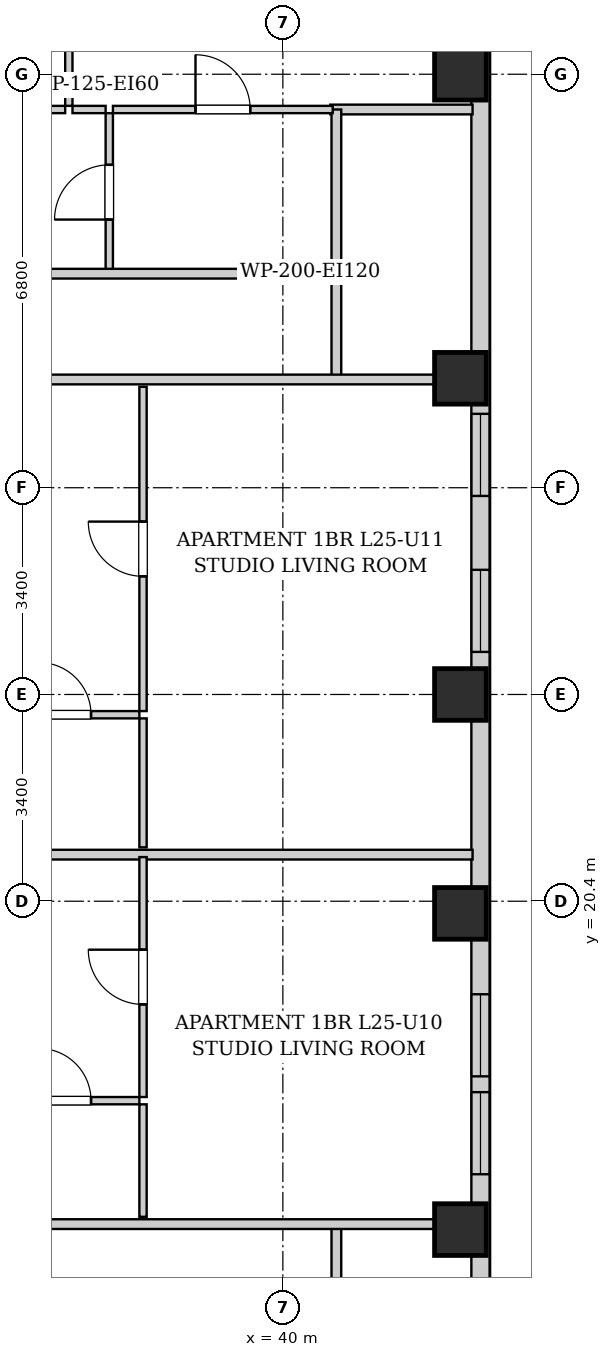
"""IFC4 building model, lengths in metres.
Left out: names, types, materials, properties, quantities, classifications, styles, units other than length and angle.
Written with IfcOpenShell. Run it as: python <this file> out.ifc"""

import sys

from ifc_helpers import new_model, si_unit, direction, frame, frame_2d, origin, origin_2d, place, context, subcontext, project, spatial, rectangle, extrude, element, fill, save


model = new_model("IFC4")
c1 = context("Model", 3, precision=1e-05, world=origin(), true_north=direction((0.0, 1.0)))
c2 = subcontext(c1, "Body", "Model", "MODEL_VIEW")
j1 = project(units=[si_unit("LENGTHUNIT", "METRE"), si_unit("PLANEANGLEUNIT", "RADIAN")], contexts=[c1])
p1 = place(None, origin())
s1 = spatial("IfcSite", under=j1, at=p1, CompositionType="ELEMENT")
p2 = place(p1, origin())
s2 = spatial("IfcBuilding", under=s1, at=p2, CompositionType="ELEMENT")
p3 = place(p2, frame((0.0, 0.0, 91.1)))
s3 = spatial("IfcBuildingStorey", under=s2, at=p3, CompositionType="ELEMENT", Elevation=91.1)
for number, where, z_axis, x_axis in (
    (1, (42.92, 15.0, 0.0), (0.0, 0.0, 1.0), (1.0, 0.0, 0.0)),
    (2, (42.92, 20.2, 0.0), (0.0, 0.0, 1.0), (1.0, 0.0, 0.0)),
    (3, (42.92, 23.8, 0.0), (0.0, 0.0, 1.0), (1.0, 0.0, 0.0)),
    (4, (42.92, 29.0, 0.0), (0.0, 0.0, 1.0), (1.0, 0.0, 0.0)),
    (5, (42.92, 34.0, 0.0), (0.0, 0.0, 1.0), (1.0, 0.0, 0.0)),
):
    element("IfcColumn", number, at=place(p3, frame(where, z_axis=z_axis, x_axis=x_axis)), inside=s3, PredefinedType="COLUMN", context=c2, shape_type="SweptSolid", body=[
        extrude(rectangle(XDim=0.85, YDim=0.85, at=origin_2d()), origin(), (0.0, 0.0, 1.0), 3.2),
    ])
p4 = place(p3, frame((43.25, 40.8, 0.0), z_axis=(0.0, 0.0, 1.0), x_axis=(0.0, -1.0, 0.0)))
e6 = element("IfcWall", 6, at=p4, inside=s3, PredefinedType="SOLIDWALL", context=c2, shape_type="SweptSolid", body=[
    extrude(rectangle(XDim=38.3, YDim=0.3, at=frame_2d((19.15, 0.0))), origin(), (0.0, 0.0, 1.0), 2.94),
])
p5 = place(p4, frame((33.495, 0.0, 0.55)))
e7 = element("IfcOpeningElement", 7, at=p5, cuts=e6, PredefinedType="OPENING", context=c2, shape_type="SweptSolid", body=[
    extrude(rectangle(XDim=1.35, YDim=1.2, at=frame_2d((0.675, 0.6))), frame((0.0, 0.16, 0.0), z_axis=(0.0, -1.0, 0.0), x_axis=(1.0, 0.0, 0.0)), (0.0, 0.0, 1.0), 0.32),
])
p6 = place(p4, frame((31.785, 0.0, 0.55)))
e8 = element("IfcOpeningElement", 8, at=p6, cuts=e6, PredefinedType="OPENING", context=c2, shape_type="SweptSolid", body=[
    extrude(rectangle(XDim=1.35, YDim=1.2, at=frame_2d((0.675, 0.6))), frame((0.0, 0.16, 0.0), z_axis=(0.0, -1.0, 0.0), x_axis=(1.0, 0.0, 0.0)), (0.0, 0.0, 1.0), 0.32),
])
p7 = place(p4, frame((3.08, 0.0, 0.55)))
e9 = element("IfcOpeningElement", 9, at=p7, cuts=e6, PredefinedType="OPENING", context=c2, shape_type="SweptSolid", body=[
    extrude(rectangle(XDim=1.35, YDim=1.2, at=frame_2d((0.675, 0.6))), frame((0.0, 0.16, 0.0), z_axis=(0.0, -1.0, 0.0), x_axis=(1.0, 0.0, 0.0)), (0.0, 0.0, 1.0), 0.32),
])
p8 = place(p4, frame((1.135, 0.0, 0.55)))
e10 = element("IfcOpeningElement", 10, at=p8, cuts=e6, PredefinedType="OPENING", context=c2, shape_type="SweptSolid", body=[
    extrude(rectangle(XDim=1.35, YDim=1.2, at=frame_2d((0.675, 0.6))), frame((0.0, 0.16, 0.0), z_axis=(0.0, -1.0, 0.0), x_axis=(1.0, 0.0, 0.0)), (0.0, 0.0, 1.0), 0.32),
])
p9 = place(p4, frame((21.93, 0.0, 0.55)))
e11 = element("IfcOpeningElement", 11, at=p9, cuts=e6, PredefinedType="OPENING", context=c2, shape_type="SweptSolid", body=[
    extrude(rectangle(XDim=1.35, YDim=1.2, at=frame_2d((0.675, 0.6))), frame((0.0, 0.16, 0.0), z_axis=(0.0, -1.0, 0.0), x_axis=(1.0, 0.0, 0.0)), (0.0, 0.0, 1.0), 0.32),
])
p10 = place(p4, frame((23.54, 0.0, 0.55)))
e12 = element("IfcOpeningElement", 12, at=p10, cuts=e6, PredefinedType="OPENING", context=c2, shape_type="SweptSolid", body=[
    extrude(rectangle(XDim=1.35, YDim=1.2, at=frame_2d((0.675, 0.6))), frame((0.0, 0.16, 0.0), z_axis=(0.0, -1.0, 0.0), x_axis=(1.0, 0.0, 0.0)), (0.0, 0.0, 1.0), 0.32),
])
p11 = place(p4, frame((14.95, 0.0, 0.55)))
e13 = element("IfcOpeningElement", 13, at=p11, cuts=e6, PredefinedType="OPENING", context=c2, shape_type="SweptSolid", body=[
    extrude(rectangle(XDim=1.35, YDim=1.2, at=frame_2d((0.675, 0.6))), frame((0.0, 0.16, 0.0), z_axis=(0.0, -1.0, 0.0), x_axis=(1.0, 0.0, 0.0)), (0.0, 0.0, 1.0), 0.32),
])
p12 = place(p4, frame((12.385, 0.0, 0.55)))
e14 = element("IfcOpeningElement", 14, at=p12, cuts=e6, PredefinedType="OPENING", context=c2, shape_type="SweptSolid", body=[
    extrude(rectangle(XDim=1.35, YDim=1.2, at=frame_2d((0.675, 0.6))), frame((0.0, 0.16, 0.0), z_axis=(0.0, -1.0, 0.0), x_axis=(1.0, 0.0, 0.0)), (0.0, 0.0, 1.0), 0.32),
])
for number, where, z_axis, x_axis in (
    (15, (40.88, 13.35, 0.0), (0.0, 0.0, 1.0), (0.0, 1.0, 0.0)),
    (16, (40.88, 28.98, 0.0), (0.0, 0.0, 1.0), (0.0, 1.0, 0.0)),
):
    element("IfcWall", number, at=place(p3, frame(where, z_axis=z_axis, x_axis=x_axis)), inside=s3, PredefinedType="PARTITIONING", context=c2, shape_type="SweptSolid", body=[
        extrude(rectangle(XDim=1.74, YDim=0.16, at=frame_2d((0.87, 0.0))), origin(), (0.0, 0.0, 1.0), 2.94),
    ])
for number, where, z_axis, x_axis in (
    (17, (35.11, 15.09, 0.0), (0.0, 0.0, 1.0), (1.0, 0.0, 0.0)),
    (18, (35.11, 28.98, 0.0), (0.0, 0.0, 1.0), (1.0, 0.0, 0.0)),
):
    element("IfcWall", number, at=place(p3, frame(where, z_axis=z_axis, x_axis=x_axis)), inside=s3, PredefinedType="PARTITIONING", context=c2, shape_type="SweptSolid", body=[
        extrude(rectangle(XDim=8.01, YDim=0.16, at=frame_2d((4.005, 0.0))), origin(), (0.0, 0.0, 1.0), 2.309),
    ])
p13 = place(p3, frame((40.78, 33.42, 0.0), z_axis=(0.0, 0.0, 1.0), x_axis=(1.0, 0.0, 0.0)))
e19 = element("IfcWall", 19, at=p13, inside=s3, PredefinedType="PARTITIONING", context=c2, shape_type="SweptSolid", body=[
    extrude(rectangle(XDim=2.34, YDim=0.16, at=frame_2d((1.17, 0.0))), origin(), (0.0, 0.0, 1.0), 2.94),
])
p14 = place(p3, frame((40.88, 30.76, 0.0), z_axis=(0.0, 0.0, 1.0), x_axis=(0.0, 1.0, 0.0)))
e20 = element("IfcWall", 20, at=p14, inside=s3, PredefinedType="PARTITIONING", context=c2, shape_type="SweptSolid", body=[
    extrude(rectangle(XDim=2.66, YDim=0.16, at=frame_2d((1.33, 0.0))), origin(), (0.0, 0.0, 1.0), 2.94),
])
p15 = place(p3, frame((37.145, 30.76, 0.0), z_axis=(0.0, 0.0, 1.0), x_axis=(0.0, 1.0, 0.0)))
e21 = element("IfcWall", 21, at=p15, inside=s3, PredefinedType="PARTITIONING", context=c2, shape_type="SweptSolid", body=[
    extrude(rectangle(XDim=2.6, YDim=0.12, at=frame_2d((1.3, 0.0))), origin(), (0.0, 0.0, 1.0), 2.94),
])
p16 = place(p15, frame((0.85, 0.0, 0.0)))
e22 = element("IfcOpeningElement", 22, at=p16, cuts=e21, PredefinedType="OPENING", context=c2, shape_type="SweptSolid", body=[
    extrude(rectangle(XDim=0.9, YDim=2.05, at=frame_2d((0.45, 1.025))), frame((0.0, 0.07, 0.0), z_axis=(0.0, -1.0, 0.0), x_axis=(1.0, 0.0, 0.0)), (0.0, 0.0, 1.0), 0.14),
])
p17 = place(p3, frame((33.7, 33.42, 0.0), z_axis=(0.0, 0.0, 1.0), x_axis=(1.0, 0.0, 0.0)))
e23 = element("IfcWall", 23, at=p17, inside=s3, PredefinedType="PARTITIONING", context=c2, shape_type="SweptSolid", body=[
    extrude(rectangle(XDim=2.72, YDim=0.12, at=frame_2d((1.36, 0.0))), origin(), (0.0, 0.0, 1.0), 2.94),
])
p18 = place(p17, frame((0.91, 0.0, 0.0)))
e24 = element("IfcOpeningElement", 24, at=p18, cuts=e23, PredefinedType="OPENING", context=c2, shape_type="SweptSolid", body=[
    extrude(rectangle(XDim=0.9, YDim=2.05, at=frame_2d((0.45, 1.025))), frame((0.0, 0.07, 0.0), z_axis=(0.0, -1.0, 0.0), x_axis=(1.0, 0.0, 0.0)), (0.0, 0.0, 1.0), 0.14),
])
p19 = place(p3, frame((36.54, 33.42, 0.0), z_axis=(0.0, 0.0, 1.0), x_axis=(1.0, 0.0, 0.0)))
e25 = element("IfcWall", 25, at=p19, inside=s3, PredefinedType="PARTITIONING", context=c2, shape_type="SweptSolid", body=[
    extrude(rectangle(XDim=0.545, YDim=0.12, at=frame_2d((0.272, 0.0))), origin(), (0.0, 0.0, 1.0), 2.94),
])
p20 = place(p3, frame((37.205, 33.42, 0.0), z_axis=(0.0, 0.0, 1.0), x_axis=(1.0, 0.0, 0.0)))
e26 = element("IfcWall", 26, at=p20, inside=s3, PredefinedType="PARTITIONING", context=c2, shape_type="SweptSolid", body=[
    extrude(rectangle(XDim=3.615, YDim=0.12, at=frame_2d((1.808, 0.0))), origin(), (0.0, 0.0, 1.0), 2.94),
])
p21 = place(p20, frame((1.358, 0.0, 0.0)))
e27 = element("IfcOpeningElement", 27, at=p21, cuts=e26, PredefinedType="OPENING", context=c2, shape_type="SweptSolid", body=[
    extrude(rectangle(XDim=0.9, YDim=2.05, at=frame_2d((0.45, 1.025))), frame((0.0, 0.07, 0.0), z_axis=(0.0, -1.0, 0.0), x_axis=(1.0, 0.0, 0.0)), (0.0, 0.0, 1.0), 0.14),
])
p22 = place(p3, frame((36.48, 33.48, 0.0), z_axis=(0.0, 0.0, 1.0), x_axis=(0.0, 1.0, 0.0)))
e28 = element("IfcWall", 28, at=p22, inside=s3, PredefinedType="PARTITIONING", context=c2, shape_type="SweptSolid", body=[
    extrude(rectangle(XDim=7.39, YDim=0.12, at=frame_2d((3.695, 0.0))), origin(), (0.0, 0.0, 1.0), 2.94),
])
p23 = place(p22, frame((3.245, 0.0, 0.0)))
e29 = element("IfcOpeningElement", 29, at=p23, cuts=e28, PredefinedType="OPENING", context=c2, shape_type="SweptSolid", body=[
    extrude(rectangle(XDim=0.9, YDim=2.05, at=frame_2d((0.45, 1.025))), frame((0.0, 0.07, 0.0), z_axis=(0.0, -1.0, 0.0), x_axis=(1.0, 0.0, 0.0)), (0.0, 0.0, 1.0), 0.14),
])
p24 = place(p3, frame((35.19, 21.166, 0.0), z_axis=(0.0, 0.0, 1.0), x_axis=(1.0, 0.0, 0.0)))
e30 = element("IfcWall", 30, at=p24, inside=s3, PredefinedType="PARTITIONING", context=c2, shape_type="SweptSolid", body=[
    extrude(rectangle(XDim=7.93, YDim=0.16, at=frame_2d((3.965, 0.0))), origin(), (0.0, 0.0, 1.0), 2.94),
])
p25 = place(p3, frame((35.19, 17.12, 0.0), z_axis=(0.0, 0.0, 1.0), x_axis=(1.0, 0.0, 0.0)))
e31 = element("IfcWall", 31, at=p25, inside=s3, PredefinedType="PARTITIONING", context=c2, shape_type="SweptSolid", body=[
    extrude(rectangle(XDim=2.45, YDim=0.12, at=frame_2d((1.225, 0.0))), origin(), (0.0, 0.0, 1.0), 2.94),
])
p26 = place(p25, frame((0.795, 0.0, 0.0)))
e32 = element("IfcOpeningElement", 32, at=p26, cuts=e31, PredefinedType="OPENING", context=c2, shape_type="SweptSolid", body=[
    extrude(rectangle(XDim=0.86, YDim=2.05, at=frame_2d((0.43, 1.025))), frame((0.0, 0.07, 0.0), z_axis=(0.0, -1.0, 0.0), x_axis=(1.0, 0.0, 0.0)), (0.0, 0.0, 1.0), 0.14),
])
p27 = place(p3, frame((37.7, 15.21, 0.0), z_axis=(0.0, 0.0, 1.0), x_axis=(0.0, 1.0, 0.0)))
e33 = element("IfcWall", 33, at=p27, inside=s3, PredefinedType="PARTITIONING", context=c2, shape_type="SweptSolid", body=[
    extrude(rectangle(XDim=1.85, YDim=0.12, at=frame_2d((0.925, 0.0))), origin(), (0.0, 0.0, 1.0), 2.94),
])
p28 = place(p3, frame((37.7, 17.18, 0.0), z_axis=(0.0, 0.0, 1.0), x_axis=(0.0, 1.0, 0.0)))
e34 = element("IfcWall", 34, at=p28, inside=s3, PredefinedType="PARTITIONING", context=c2, shape_type="SweptSolid", body=[
    extrude(rectangle(XDim=3.946, YDim=0.12, at=frame_2d((1.973, 0.0))), origin(), (0.0, 0.0, 1.0), 2.94),
])
p29 = place(p28, frame((1.523, 0.0, 0.0)))
e35 = element("IfcOpeningElement", 35, at=p29, cuts=e34, PredefinedType="OPENING", context=c2, shape_type="SweptSolid", body=[
    extrude(rectangle(XDim=0.9, YDim=2.05, at=frame_2d((0.45, 1.025))), frame((0.0, 0.07, 0.0), z_axis=(0.0, -1.0, 0.0), x_axis=(1.0, 0.0, 0.0)), (0.0, 0.0, 1.0), 0.14),
])
p30 = place(p3, frame((35.19, 23.467, 0.0), z_axis=(0.0, 0.0, 1.0), x_axis=(1.0, 0.0, 0.0)))
e36 = element("IfcWall", 36, at=p30, inside=s3, PredefinedType="PARTITIONING", context=c2, shape_type="SweptSolid", body=[
    extrude(rectangle(XDim=2.45, YDim=0.12, at=frame_2d((1.225, 0.0))), origin(), (0.0, 0.0, 1.0), 2.94),
])
p31 = place(p30, frame((0.795, 0.0, 0.0)))
e37 = element("IfcOpeningElement", 37, at=p31, cuts=e36, PredefinedType="OPENING", context=c2, shape_type="SweptSolid", body=[
    extrude(rectangle(XDim=0.86, YDim=2.05, at=frame_2d((0.43, 1.025))), frame((0.0, 0.07, 0.0), z_axis=(0.0, -1.0, 0.0), x_axis=(1.0, 0.0, 0.0)), (0.0, 0.0, 1.0), 0.14),
])
p32 = place(p3, frame((37.7, 21.286, 0.0), z_axis=(0.0, 0.0, 1.0), x_axis=(0.0, 1.0, 0.0)))
e38 = element("IfcWall", 38, at=p32, inside=s3, PredefinedType="PARTITIONING", context=c2, shape_type="SweptSolid", body=[
    extrude(rectangle(XDim=2.121, YDim=0.12, at=frame_2d((1.061, 0.0))), origin(), (0.0, 0.0, 1.0), 2.94),
])
p33 = place(p3, frame((37.7, 23.527, 0.0), z_axis=(0.0, 0.0, 1.0), x_axis=(0.0, 1.0, 0.0)))
e39 = element("IfcWall", 39, at=p33, inside=s3, PredefinedType="PARTITIONING", context=c2, shape_type="SweptSolid", body=[
    extrude(rectangle(XDim=5.333, YDim=0.12, at=frame_2d((2.667, 0.0))), origin(), (0.0, 0.0, 1.0), 2.94),
])
p34 = place(p33, frame((2.216, 0.0, 0.0)))
e40 = element("IfcOpeningElement", 40, at=p34, cuts=e39, PredefinedType="OPENING", context=c2, shape_type="SweptSolid", body=[
    extrude(rectangle(XDim=0.9, YDim=2.05, at=frame_2d((0.45, 1.025))), frame((0.0, 0.07, 0.0), z_axis=(0.0, -1.0, 0.0), x_axis=(1.0, 0.0, 0.0)), (0.0, 0.0, 1.0), 0.14),
])
p35 = place(p3, frame((10.05, 30.72, 0.0), z_axis=(0.0, 0.0, 1.0), x_axis=(1.0, 0.0, 0.0)))
e41 = element("IfcWall", 41, at=p35, inside=s3, PredefinedType="PARTITIONING", context=c2, shape_type="SweptSolid", body=[
    extrude(rectangle(XDim=30.8, YDim=0.16, at=frame_2d((15.4, 0.0))), origin(), (0.0, 0.0, 1.0), 2.94),
])
p36 = place(p35, frame((4.295, 0.0, 0.0)))
e42 = element("IfcOpeningElement", 42, at=p36, cuts=e41, PredefinedType="OPENING", context=c2, shape_type="SweptSolid", body=[
    extrude(rectangle(XDim=0.95, YDim=2.1, at=frame_2d((0.475, 1.05))), frame((0.0, 0.09, 0.0), z_axis=(0.0, -1.0, 0.0), x_axis=(1.0, 0.0, 0.0)), (0.0, 0.0, 1.0), 0.18),
])
p37 = place(p35, frame((14.179, 0.0, 0.0)))
e43 = element("IfcOpeningElement", 43, at=p37, cuts=e41, PredefinedType="OPENING", context=c2, shape_type="SweptSolid", body=[
    extrude(rectangle(XDim=0.95, YDim=2.1, at=frame_2d((0.475, 1.05))), frame((0.0, 0.09, 0.0), z_axis=(0.0, -1.0, 0.0), x_axis=(1.0, 0.0, 0.0)), (0.0, 0.0, 1.0), 0.18),
])
p38 = place(p35, frame((20.965, 0.0, 0.0)))
e44 = element("IfcOpeningElement", 44, at=p38, cuts=e41, PredefinedType="OPENING", context=c2, shape_type="SweptSolid", body=[
    extrude(rectangle(XDim=0.95, YDim=2.1, at=frame_2d((0.475, 1.05))), frame((0.0, 0.09, 0.0), z_axis=(0.0, -1.0, 0.0), x_axis=(1.0, 0.0, 0.0)), (0.0, 0.0, 1.0), 0.18),
])
p39 = place(p16, origin())
e45 = element("IfcDoor", 45, at=p39, inside=s3, OperationType="SINGLE_SWING_LEFT", PredefinedType="DOOR", context=c2, shape_type="SweptSolid", body=[
    extrude(rectangle(XDim=0.9, YDim=2.05, at=frame_2d((0.45, 1.025))), frame((0.0, 0.025, 0.0), z_axis=(0.0, -1.0, 0.0), x_axis=(1.0, 0.0, 0.0)), (0.0, 0.0, 1.0), 0.05),
])
fill(e22, e45)
p40 = place(p21, origin())
e46 = element("IfcDoor", 46, at=p40, inside=s3, OperationType="SINGLE_SWING_LEFT", PredefinedType="DOOR", context=c2, shape_type="SweptSolid", body=[
    extrude(rectangle(XDim=0.9, YDim=2.05, at=frame_2d((0.45, 1.025))), frame((0.0, 0.025, 0.0), z_axis=(0.0, -1.0, 0.0), x_axis=(1.0, 0.0, 0.0)), (0.0, 0.0, 1.0), 0.05),
])
fill(e27, e46)
p41 = place(p26, origin())
e47 = element("IfcDoor", 47, at=p41, inside=s3, OperationType="SINGLE_SWING_LEFT", PredefinedType="DOOR", context=c2, shape_type="SweptSolid", body=[
    extrude(rectangle(XDim=0.86, YDim=2.05, at=frame_2d((0.43, 1.025))), frame((0.0, 0.025, 0.0), z_axis=(0.0, -1.0, 0.0), x_axis=(1.0, 0.0, 0.0)), (0.0, 0.0, 1.0), 0.05),
])
fill(e32, e47)
p42 = place(p29, origin())
e48 = element("IfcDoor", 48, at=p42, inside=s3, OperationType="SINGLE_SWING_RIGHT", PredefinedType="DOOR", context=c2, shape_type="SweptSolid", body=[
    extrude(rectangle(XDim=0.9, YDim=2.05, at=frame_2d((0.45, 1.025))), frame((0.0, 0.025, 0.0), z_axis=(0.0, -1.0, 0.0), x_axis=(1.0, 0.0, 0.0)), (0.0, 0.0, 1.0), 0.05),
])
fill(e35, e48)
p43 = place(p31, origin())
e49 = element("IfcDoor", 49, at=p43, inside=s3, OperationType="SINGLE_SWING_LEFT", PredefinedType="DOOR", context=c2, shape_type="SweptSolid", body=[
    extrude(rectangle(XDim=0.86, YDim=2.05, at=frame_2d((0.43, 1.025))), frame((0.0, 0.025, 0.0), z_axis=(0.0, -1.0, 0.0), x_axis=(1.0, 0.0, 0.0)), (0.0, 0.0, 1.0), 0.05),
])
fill(e37, e49)
p44 = place(p34, origin())
e50 = element("IfcDoor", 50, at=p44, inside=s3, OperationType="SINGLE_SWING_RIGHT", PredefinedType="DOOR", context=c2, shape_type="SweptSolid", body=[
    extrude(rectangle(XDim=0.9, YDim=2.05, at=frame_2d((0.45, 1.025))), frame((0.0, 0.025, 0.0), z_axis=(0.0, -1.0, 0.0), x_axis=(1.0, 0.0, 0.0)), (0.0, 0.0, 1.0), 0.05),
])
fill(e40, e50)
p45 = place(p9, origin())
e51 = element("IfcWindow", 51, at=p45, inside=s3, PartitioningType="SINGLE_PANEL", PredefinedType="WINDOW", context=c2, shape_type="SweptSolid", body=[
    extrude(rectangle(XDim=1.35, YDim=1.2, at=frame_2d((0.675, 0.6))), frame((0.0, 0.03, 0.0), z_axis=(0.0, -1.0, 0.0), x_axis=(1.0, 0.0, 0.0)), (0.0, 0.0, 1.0), 0.06),
])
fill(e11, e51)
p46 = place(p10, origin())
e52 = element("IfcWindow", 52, at=p46, inside=s3, PartitioningType="SINGLE_PANEL", PredefinedType="WINDOW", context=c2, shape_type="SweptSolid", body=[
    extrude(rectangle(XDim=1.35, YDim=1.2, at=frame_2d((0.675, 0.6))), frame((0.0, 0.03, 0.0), z_axis=(0.0, -1.0, 0.0), x_axis=(1.0, 0.0, 0.0)), (0.0, 0.0, 1.0), 0.06),
])
fill(e12, e52)
p47 = place(p11, origin())
e53 = element("IfcWindow", 53, at=p47, inside=s3, PartitioningType="SINGLE_PANEL", PredefinedType="WINDOW", context=c2, shape_type="SweptSolid", body=[
    extrude(rectangle(XDim=1.35, YDim=1.2, at=frame_2d((0.675, 0.6))), frame((0.0, 0.03, 0.0), z_axis=(0.0, -1.0, 0.0), x_axis=(1.0, 0.0, 0.0)), (0.0, 0.0, 1.0), 0.06),
])
fill(e13, e53)
p48 = place(p12, origin())
e54 = element("IfcWindow", 54, at=p48, inside=s3, PartitioningType="SINGLE_PANEL", PredefinedType="WINDOW", context=c2, shape_type="SweptSolid", body=[
    extrude(rectangle(XDim=1.35, YDim=1.2, at=frame_2d((0.675, 0.6))), frame((0.0, 0.03, 0.0), z_axis=(0.0, -1.0, 0.0), x_axis=(1.0, 0.0, 0.0)), (0.0, 0.0, 1.0), 0.06),
])
fill(e14, e54)
save(model, sys.argv[1])
